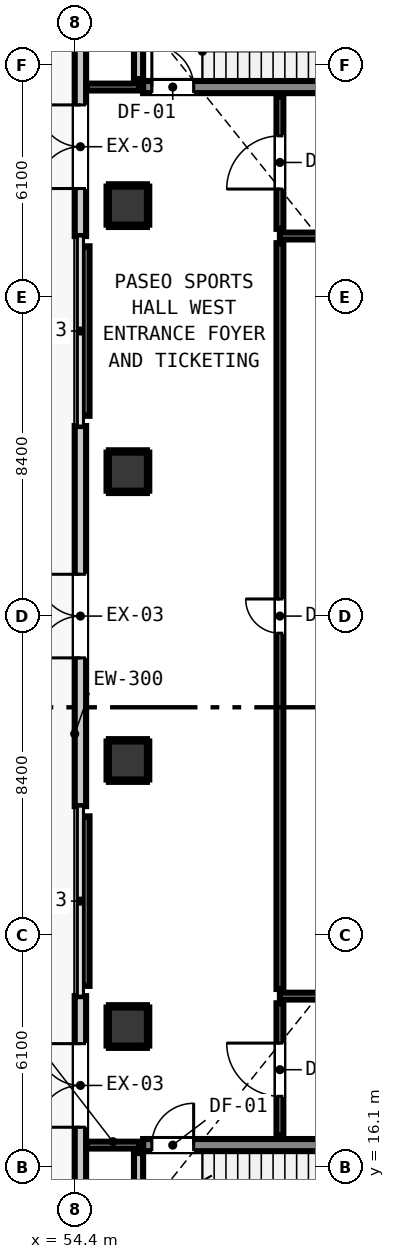
"""IFC4 building model, lengths in metres.
Left out: names, types, materials, properties, quantities, classifications, styles, units other than length and angle.
Written with IfcOpenShell. Run it as: python <this file> out.ifc"""

import sys

from ifc_helpers import new_model, si_unit, direction, frame, frame_2d, origin, origin_2d, place, context, subcontext, project, spatial, rectangle, extrude, element, fill, save


model = new_model("IFC4")
c1 = context("Model", 3, precision=1e-05, world=origin(), true_north=direction((0.0, 1.0)))
c2 = subcontext(c1, "Body", "Model", "MODEL_VIEW")
j1 = project(units=[si_unit("LENGTHUNIT", "METRE"), si_unit("PLANEANGLEUNIT", "RADIAN")], contexts=[c1])
p1 = place(None, origin())
s1 = spatial("IfcSite", under=j1, at=p1, CompositionType="ELEMENT")
p2 = place(p1, origin())
s2 = spatial("IfcBuilding", under=s1, at=p2, CompositionType="ELEMENT")
p3 = place(p2, origin())
s3 = spatial("IfcBuildingStorey", under=s2, at=p3, CompositionType="ELEMENT", Elevation=0.0)
p4 = place(p3, frame((56.2, 16.68, 0.0), z_axis=(0.0, 0.0, 1.0), x_axis=(1.0, 0.0, 0.0)))
e1 = element("IfcWall", 1, at=p4, inside=s3, PredefinedType="SHEAR", context=c2, shape_type="SweptSolid", body=[
    extrude(rectangle(XDim=8.4, YDim=0.32, at=frame_2d((4.2, 0.0))), origin(), (0.0, 0.0, 1.0), 5.2),
])
p5 = place(p4, frame((0.23, 0.0, 0.0)))
e2 = element("IfcOpeningElement", 2, at=p5, cuts=e1, PredefinedType="OPENING", context=c2, shape_type="SweptSolid", body=[
    extrude(rectangle(XDim=1.1, YDim=2.15, at=frame_2d((0.55, 1.075))), frame((0.0, 0.17, 0.0), z_axis=(0.0, -1.0, 0.0), x_axis=(1.0, 0.0, 0.0)), (0.0, 0.0, 1.0), 0.34),
])
p6 = place(p3, frame((56.2, 44.52, 0.0), z_axis=(0.0, 0.0, 1.0), x_axis=(1.0, 0.0, 0.0)))
e3 = element("IfcWall", 3, at=p6, inside=s3, PredefinedType="SHEAR", context=c2, shape_type="SweptSolid", body=[
    extrude(rectangle(XDim=8.4, YDim=0.32, at=frame_2d((4.2, 0.0))), origin(), (0.0, 0.0, 1.0), 5.2),
])
p7 = place(p6, frame((0.23, 0.0, 0.0)))
e4 = element("IfcOpeningElement", 4, at=p7, cuts=e3, PredefinedType="OPENING", context=c2, shape_type="SweptSolid", body=[
    extrude(rectangle(XDim=1.1, YDim=2.15, at=frame_2d((0.55, 1.075))), frame((0.0, 0.17, 0.0), z_axis=(0.0, -1.0, 0.0), x_axis=(1.0, 0.0, 0.0)), (0.0, 0.0, 1.0), 0.34),
])
for number, where, z_axis, x_axis in (
    (5, (55.8, 19.8, 0.0), (0.0, 0.0, 1.0), (1.0, 0.0, 0.0)),
    (6, (55.8, 26.8, 0.0), (0.0, 0.0, 1.0), (1.0, 0.0, 0.0)),
    (7, (55.8, 34.4, 0.0), (0.0, 0.0, 1.0), (1.0, 0.0, 0.0)),
    (8, (55.8, 41.4, 0.0), (0.0, 0.0, 1.0), (1.0, 0.0, 0.0)),
):
    element("IfcColumn", number, at=place(p3, frame(where, z_axis=z_axis, x_axis=x_axis)), inside=s3, PredefinedType="COLUMN", context=c2, shape_type="SweptSolid", body=[
        extrude(rectangle(XDim=1.0, YDim=1.0, at=origin_2d()), origin(), (0.0, 0.0, 1.0), 5.2),
    ])
p8 = place(p3, frame((54.55, 12.9, 0.0), z_axis=(0.0, 0.0, 1.0), x_axis=(0.0, 1.0, 0.0)))
e9 = element("IfcWall", 9, at=p8, inside=s3, PredefinedType="STANDARD", context=c2, shape_type="SweptSolid", body=[
    extrude(rectangle(XDim=7.7, YDim=0.3, at=frame_2d((3.85, 0.0))), origin(), (0.0, 0.0, 1.0), 4.92),
])
p9 = place(p8, frame((4.25, 0.0, 0.0)))
e10 = element("IfcOpeningElement", 10, at=p9, cuts=e9, PredefinedType="OPENING", context=c2, shape_type="SweptSolid", body=[
    extrude(rectangle(XDim=2.2, YDim=2.4, at=frame_2d((1.1, 1.2))), frame((0.0, 0.16, 0.0), z_axis=(0.0, -1.0, 0.0), x_axis=(1.0, 0.0, 0.0)), (0.0, 0.0, 1.0), 0.32),
])
p10 = place(p3, frame((54.55, 25.6, 0.0), z_axis=(0.0, 0.0, 1.0), x_axis=(0.0, 1.0, 0.0)))
e11 = element("IfcWall", 11, at=p10, inside=s3, PredefinedType="STANDARD", context=c2, shape_type="SweptSolid", body=[
    extrude(rectangle(XDim=10.0, YDim=0.3, at=frame_2d((5.0, 0.0))), origin(), (0.0, 0.0, 1.0), 4.92),
])
p11 = place(p10, frame((3.9, 0.0, 0.0)))
e12 = element("IfcOpeningElement", 12, at=p11, cuts=e11, PredefinedType="OPENING", context=c2, shape_type="SweptSolid", body=[
    extrude(rectangle(XDim=2.2, YDim=2.4, at=frame_2d((1.1, 1.2))), frame((0.0, 0.16, 0.0), z_axis=(0.0, -1.0, 0.0), x_axis=(1.0, 0.0, 0.0)), (0.0, 0.0, 1.0), 0.32),
])
p12 = place(p3, frame((54.55, 40.6, 0.0), z_axis=(0.0, 0.0, 1.0), x_axis=(0.0, 1.0, 0.0)))
e13 = element("IfcWall", 13, at=p12, inside=s3, PredefinedType="STANDARD", context=c2, shape_type="SweptSolid", body=[
    extrude(rectangle(XDim=7.7, YDim=0.3, at=frame_2d((3.85, 0.0))), origin(), (0.0, 0.0, 1.0), 4.92),
])
p13 = place(p12, frame((1.25, 0.0, 0.0)))
e14 = element("IfcOpeningElement", 14, at=p13, cuts=e13, PredefinedType="OPENING", context=c2, shape_type="SweptSolid", body=[
    extrude(rectangle(XDim=2.2, YDim=2.4, at=frame_2d((1.1, 1.2))), frame((0.0, 0.16, 0.0), z_axis=(0.0, -1.0, 0.0), x_axis=(1.0, 0.0, 0.0)), (0.0, 0.0, 1.0), 0.32),
])
for number, where, z_axis, x_axis in (
    (15, (56.08, 14.432, 0.0), (0.0, 0.0, 1.0), (0.0, 1.0, 0.0)),
    (16, (56.08, 44.73, 0.0), (0.0, 0.0, 1.0), (0.0, 1.0, 0.0)),
):
    element("IfcWall", number, at=place(p3, frame(where, z_axis=z_axis, x_axis=x_axis)), inside=s3, PredefinedType="PARTITIONING", context=c2, shape_type="SweptSolid", body=[
        extrude(rectangle(XDim=2.038, YDim=0.24, at=frame_2d((1.019, 0.0))), origin(), (0.0, 0.0, 1.0), 4.155),
    ])
p14 = place(p3, frame((54.712, 16.68, 0.0), z_axis=(0.0, 0.0, 1.0), x_axis=(1.0, 0.0, 0.0)))
e17 = element("IfcWall", 17, at=p14, inside=s3, PredefinedType="PARTITIONING", context=c2, shape_type="SweptSolid", body=[
    extrude(rectangle(XDim=1.388, YDim=0.18, at=frame_2d((0.694, 0.0))), origin(), (0.0, 0.0, 1.0), 4.92),
])
for number, where, z_axis, x_axis in (
    (18, (59.8, 20.6, 0.0), (0.0, 0.0, 1.0), (1.0, 0.0, 0.0)),
    (19, (59.8, 40.6, 0.0), (0.0, 0.0, 1.0), (1.0, 0.0, 0.0)),
):
    element("IfcWall", number, at=place(p3, frame(where, z_axis=z_axis, x_axis=x_axis)), inside=s3, PredefinedType="PARTITIONING", context=c2, shape_type="SweptSolid", body=[
        extrude(rectangle(XDim=18.0, YDim=0.18, at=frame_2d((9.0, 0.0))), origin(), (0.0, 0.0, 1.0), 4.92),
    ])
p15 = place(p3, frame((54.712, 44.52, 0.0), z_axis=(0.0, 0.0, 1.0), x_axis=(1.0, 0.0, 0.0)))
e20 = element("IfcWall", 20, at=p15, inside=s3, PredefinedType="PARTITIONING", context=c2, shape_type="SweptSolid", body=[
    extrude(rectangle(XDim=1.388, YDim=0.18, at=frame_2d((0.694, 0.0))), origin(), (0.0, 0.0, 1.0), 4.92),
])
for number, where, z_axis, x_axis in (
    (21, (54.7, 20.87, 0.0), (0.0, 0.0, 1.0), (0.0, 1.0, 0.0)),
    (22, (54.7, 35.87, 0.0), (0.0, 0.0, 1.0), (0.0, 1.0, 0.0)),
):
    element("IfcWall", number, at=place(p3, frame(where, z_axis=z_axis, x_axis=x_axis)), inside=s3, PredefinedType="PARTITIONING", context=c2, shape_type="SweptSolid", body=[
        extrude(rectangle(XDim=4.46, YDim=0.18, at=frame_2d((2.23, 0.0))), origin(), (0.0, 0.0, 1.0), 4.92),
    ])
p16 = place(p3, frame((59.8, 16.94, 0.0), z_axis=(0.0, 0.0, 1.0), x_axis=(0.0, 1.0, 0.0)))
e23 = element("IfcWall", 23, at=p16, inside=s3, PredefinedType="PARTITIONING", context=c2, shape_type="SweptSolid", body=[
    extrude(rectangle(XDim=3.472, YDim=0.18, at=frame_2d((1.736, 0.0))), origin(), (0.0, 0.0, 1.0), 4.92),
])
p17 = place(p16, frame((1.024, 0.0, 0.0)))
e24 = element("IfcOpeningElement", 24, at=p17, cuts=e23, PredefinedType="OPENING", context=c2, shape_type="SweptSolid", body=[
    extrude(rectangle(XDim=1.4, YDim=2.15, at=frame_2d((0.7, 1.075))), frame((0.0, 0.1, 0.0), z_axis=(0.0, -1.0, 0.0), x_axis=(1.0, 0.0, 0.0)), (0.0, 0.0, 1.0), 0.2),
])
p18 = place(p3, frame((59.8, 20.788, 0.0), z_axis=(0.0, 0.0, 1.0), x_axis=(0.0, 1.0, 0.0)))
e25 = element("IfcWall", 25, at=p18, inside=s3, PredefinedType="PARTITIONING", context=c2, shape_type="SweptSolid", body=[
    extrude(rectangle(XDim=19.624, YDim=0.18, at=frame_2d((9.812, 0.0))), origin(), (0.0, 0.0, 1.0), 4.92),
])
p19 = place(p18, frame((9.362, 0.0, 0.0)))
e26 = element("IfcOpeningElement", 26, at=p19, cuts=e25, PredefinedType="OPENING", context=c2, shape_type="SweptSolid", body=[
    extrude(rectangle(XDim=0.9, YDim=2.1, at=frame_2d((0.45, 1.05))), frame((0.0, 0.1, 0.0), z_axis=(0.0, -1.0, 0.0), x_axis=(1.0, 0.0, 0.0)), (0.0, 0.0, 1.0), 0.2),
])
p20 = place(p3, frame((59.8, 40.788, 0.0), z_axis=(0.0, 0.0, 1.0), x_axis=(0.0, 1.0, 0.0)))
e27 = element("IfcWall", 27, at=p20, inside=s3, PredefinedType="PARTITIONING", context=c2, shape_type="SweptSolid", body=[
    extrude(rectangle(XDim=3.472, YDim=0.18, at=frame_2d((1.736, 0.0))), origin(), (0.0, 0.0, 1.0), 4.92),
])
p21 = place(p20, frame((1.048, 0.0, 0.0)))
e28 = element("IfcOpeningElement", 28, at=p21, cuts=e27, PredefinedType="OPENING", context=c2, shape_type="SweptSolid", body=[
    extrude(rectangle(XDim=1.4, YDim=2.15, at=frame_2d((0.7, 1.075))), frame((0.0, 0.1, 0.0), z_axis=(0.0, -1.0, 0.0), x_axis=(1.0, 0.0, 0.0)), (0.0, 0.0, 1.0), 0.2),
])
for number, where, z_axis, x_axis in (
    (29, (55.3, 19.268, 0.0), (0.0, 0.0, 1.0), (1.0, 0.0, 0.0)),
    (30, (55.3, 20.332, 0.0), (0.0, 0.0, 1.0), (1.0, 0.0, 0.0)),
    (31, (55.268, 19.3, 0.0), (0.0, 0.0, 1.0), (0.0, 1.0, 0.0)),
    (32, (56.332, 19.3, 0.0), (0.0, 0.0, 1.0), (0.0, 1.0, 0.0)),
    (33, (55.3, 26.268, 0.0), (0.0, 0.0, 1.0), (1.0, 0.0, 0.0)),
    (34, (55.3, 27.332, 0.0), (0.0, 0.0, 1.0), (1.0, 0.0, 0.0)),
    (35, (55.268, 26.3, 0.0), (0.0, 0.0, 1.0), (0.0, 1.0, 0.0)),
    (36, (56.332, 26.3, 0.0), (0.0, 0.0, 1.0), (0.0, 1.0, 0.0)),
    (37, (55.3, 33.868, 0.0), (0.0, 0.0, 1.0), (1.0, 0.0, 0.0)),
    (38, (55.3, 34.932, 0.0), (0.0, 0.0, 1.0), (1.0, 0.0, 0.0)),
    (39, (55.268, 33.9, 0.0), (0.0, 0.0, 1.0), (0.0, 1.0, 0.0)),
    (40, (56.332, 33.9, 0.0), (0.0, 0.0, 1.0), (0.0, 1.0, 0.0)),
    (41, (55.3, 40.868, 0.0), (0.0, 0.0, 1.0), (1.0, 0.0, 0.0)),
    (42, (55.3, 41.932, 0.0), (0.0, 0.0, 1.0), (1.0, 0.0, 0.0)),
    (43, (55.268, 40.9, 0.0), (0.0, 0.0, 1.0), (0.0, 1.0, 0.0)),
    (44, (56.332, 40.9, 0.0), (0.0, 0.0, 1.0), (0.0, 1.0, 0.0)),
):
    element("IfcWall", number, at=place(p3, frame(where, z_axis=z_axis, x_axis=x_axis)), inside=s3, PredefinedType="PARTITIONING", context=c2, shape_type="SweptSolid", body=[
        extrude(rectangle(XDim=1.0, YDim=0.06, at=frame_2d((0.5, 0.0))), origin(), (0.0, 0.0, 1.0), 1.45),
    ])
p22 = place(p11, origin())
e45 = element("IfcDoor", 45, at=p22, inside=s3, OperationType="DOUBLE_DOOR_SINGLE_SWING", PredefinedType="DOOR", context=c2, shape_type="SweptSolid", body=[
    extrude(rectangle(XDim=2.2, YDim=2.4, at=frame_2d((1.1, 1.2))), frame((0.0, 0.025, 0.0), z_axis=(0.0, -1.0, 0.0), x_axis=(1.0, 0.0, 0.0)), (0.0, 0.0, 1.0), 0.05),
])
fill(e12, e45)
p23 = place(p9, origin())
e46 = element("IfcDoor", 46, at=p23, inside=s3, OperationType="DOUBLE_DOOR_SINGLE_SWING", PredefinedType="DOOR", context=c2, shape_type="SweptSolid", body=[
    extrude(rectangle(XDim=2.2, YDim=2.4, at=frame_2d((1.1, 1.2))), frame((0.0, 0.025, 0.0), z_axis=(0.0, -1.0, 0.0), x_axis=(1.0, 0.0, 0.0)), (0.0, 0.0, 1.0), 0.05),
])
fill(e10, e46)
p24 = place(p13, origin())
e47 = element("IfcDoor", 47, at=p24, inside=s3, OperationType="DOUBLE_DOOR_SINGLE_SWING", PredefinedType="DOOR", context=c2, shape_type="SweptSolid", body=[
    extrude(rectangle(XDim=2.2, YDim=2.4, at=frame_2d((1.1, 1.2))), frame((0.0, 0.025, 0.0), z_axis=(0.0, -1.0, 0.0), x_axis=(1.0, 0.0, 0.0)), (0.0, 0.0, 1.0), 0.05),
])
fill(e14, e47)
p25 = place(p5, origin())
e48 = element("IfcDoor", 48, at=p25, inside=s3, OperationType="SINGLE_SWING_RIGHT", PredefinedType="DOOR", context=c2, shape_type="SweptSolid", body=[
    extrude(rectangle(XDim=1.1, YDim=2.15, at=frame_2d((0.55, 1.075))), frame((0.0, 0.025, 0.0), z_axis=(0.0, -1.0, 0.0), x_axis=(1.0, 0.0, 0.0)), (0.0, 0.0, 1.0), 0.05),
])
fill(e2, e48)
p26 = place(p7, origin())
e49 = element("IfcDoor", 49, at=p26, inside=s3, OperationType="SINGLE_SWING_LEFT", PredefinedType="DOOR", context=c2, shape_type="SweptSolid", body=[
    extrude(rectangle(XDim=1.1, YDim=2.15, at=frame_2d((0.55, 1.075))), frame((0.0, 0.025, 0.0), z_axis=(0.0, -1.0, 0.0), x_axis=(1.0, 0.0, 0.0)), (0.0, 0.0, 1.0), 0.05),
])
fill(e4, e49)
p27 = place(p17, origin())
e50 = element("IfcDoor", 50, at=p27, inside=s3, OperationType="SINGLE_SWING_RIGHT", PredefinedType="DOOR", context=c2, shape_type="SweptSolid", body=[
    extrude(rectangle(XDim=1.4, YDim=2.15, at=frame_2d((0.7, 1.075))), frame((0.0, 0.025, 0.0), z_axis=(0.0, -1.0, 0.0), x_axis=(1.0, 0.0, 0.0)), (0.0, 0.0, 1.0), 0.05),
])
fill(e24, e50)
p28 = place(p21, origin())
e51 = element("IfcDoor", 51, at=p28, inside=s3, OperationType="SINGLE_SWING_LEFT", PredefinedType="DOOR", context=c2, shape_type="SweptSolid", body=[
    extrude(rectangle(XDim=1.4, YDim=2.15, at=frame_2d((0.7, 1.075))), frame((0.0, 0.025, 0.0), z_axis=(0.0, -1.0, 0.0), x_axis=(1.0, 0.0, 0.0)), (0.0, 0.0, 1.0), 0.05),
])
fill(e28, e51)
p29 = place(p19, origin())
e52 = element("IfcDoor", 52, at=p29, inside=s3, OperationType="SINGLE_SWING_RIGHT", PredefinedType="DOOR", context=c2, shape_type="SweptSolid", body=[
    extrude(rectangle(XDim=0.9, YDim=2.1, at=frame_2d((0.45, 1.05))), frame((0.0, 0.025, 0.0), z_axis=(0.0, -1.0, 0.0), x_axis=(1.0, 0.0, 0.0)), (0.0, 0.0, 1.0), 0.05),
])
fill(e26, e52)
save(model, sys.argv[1])
